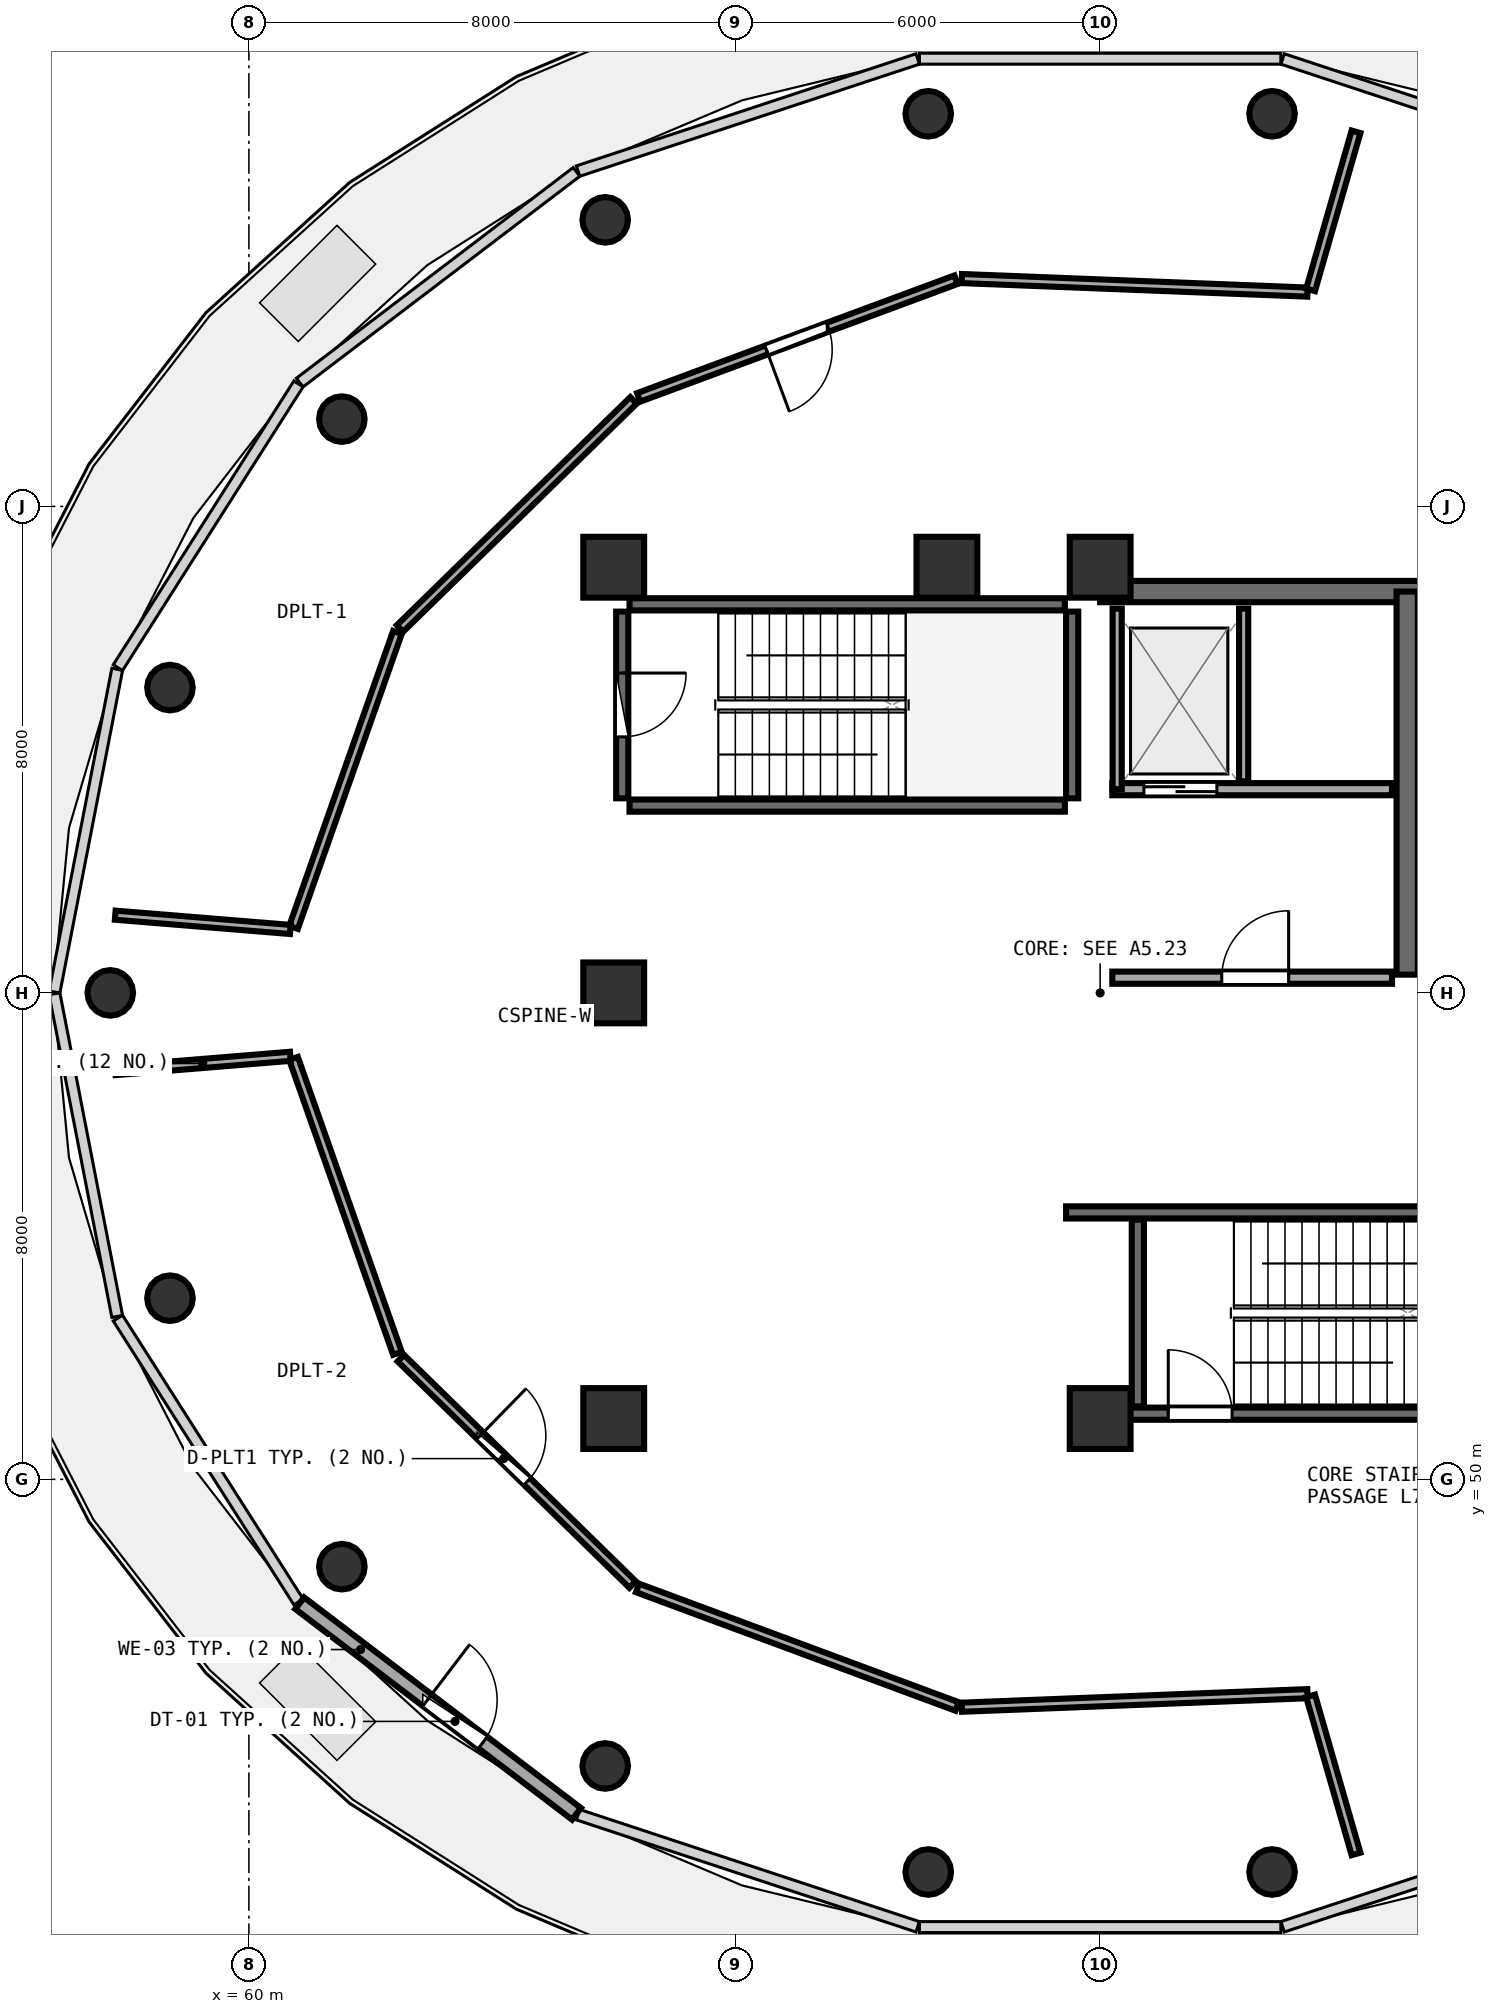
"""IFC4 building model, lengths in metres.
Left out: names, types, materials, properties, quantities, classifications, styles, units other than length and angle.
Written with IfcOpenShell. Run it as: python <this file> out.ifc"""

import sys

from ifc_helpers import new_model, si_unit, direction, frame, frame_2d, origin, origin_2d, place, context, subcontext, project, spatial, rectangle, circle, extrude, element, fill, save


model = new_model("IFC4")
c1 = context("Model", 3, precision=1e-05, world=origin(), true_north=direction((0.0, 1.0)))
c2 = subcontext(c1, "Body", "Model", "MODEL_VIEW")
j1 = project(units=[si_unit("LENGTHUNIT", "METRE"), si_unit("PLANEANGLEUNIT", "RADIAN")], contexts=[c1])
p1 = place(None, origin())
s1 = spatial("IfcSite", under=j1, at=p1, CompositionType="ELEMENT")
p2 = place(p1, origin())
s2 = spatial("IfcBuilding", under=s1, at=p2, CompositionType="ELEMENT")
p3 = place(p2, frame((0.0, 0.0, 298.5)))
s3 = spatial("IfcBuildingStorey", under=s2, at=p3, CompositionType="ELEMENT", Elevation=298.5)
for number, where, z_axis, x_axis in (
    (1, (66.0, 51.0, 0.0), (0.0, 0.0, 1.0), (1.0, 0.0, 0.0)),
    (2, (74.0, 51.0, 0.0), (0.0, 0.0, 1.0), (1.0, 0.0, 0.0)),
    (3, (74.0, 65.0, 0.0), (0.0, 0.0, 1.0), (1.0, 0.0, 0.0)),
    (4, (71.48, 65.0, 0.0), (0.0, 0.0, 1.0), (1.0, 0.0, 0.0)),
    (5, (66.0, 65.0, 0.0), (0.0, 0.0, 1.0), (1.0, 0.0, 0.0)),
    (6, (66.0, 58.0, 0.0), (0.0, 0.0, 1.0), (1.0, 0.0, 0.0)),
):
    element("IfcColumn", number, at=place(p3, frame(where, z_axis=z_axis, x_axis=x_axis)), inside=s3, PredefinedType="PILASTER", context=c2, shape_type="SweptSolid", body=[
        extrude(rectangle(XDim=1.0, YDim=1.0, at=origin_2d()), origin(), (0.0, 0.0, 1.0), 4.2),
    ])
for number, where, z_axis, x_axis in (
    (7, (76.827, 72.457, 0.0), (0.0, 0.0, 1.0), (1.0, 0.0, 0.0)),
    (8, (71.173, 72.457, 0.0), (0.0, 0.0, 1.0), (1.0, 0.0, 0.0)),
    (9, (65.86, 70.713, 0.0), (0.0, 0.0, 1.0), (1.0, 0.0, 0.0)),
    (10, (61.529, 67.436, 0.0), (0.0, 0.0, 1.0), (1.0, 0.0, 0.0)),
    (11, (58.702, 63.021, 0.0), (0.0, 0.0, 1.0), (1.0, 0.0, 0.0)),
    (12, (57.72, 58.0, 0.0), (0.0, 0.0, 1.0), (1.0, 0.0, 0.0)),
    (13, (58.702, 52.979, 0.0), (0.0, 0.0, 1.0), (1.0, 0.0, 0.0)),
    (14, (61.529, 48.564, 0.0), (0.0, 0.0, 1.0), (1.0, 0.0, 0.0)),
    (15, (65.86, 45.287, 0.0), (0.0, 0.0, 1.0), (1.0, 0.0, 0.0)),
    (16, (71.173, 43.543, 0.0), (0.0, 0.0, 1.0), (1.0, 0.0, 0.0)),
    (17, (76.827, 43.543, 0.0), (0.0, 0.0, 1.0), (1.0, 0.0, 0.0)),
):
    element("IfcColumn", number, at=place(p3, frame(where, z_axis=z_axis, x_axis=x_axis)), inside=s3, PredefinedType="COLUMN", context=c2, shape_type="SweptSolid", body=[
        extrude(circle(Radius=0.375, at=origin_2d()), origin(), (0.0, 0.0, 1.0), 4.2),
    ])
p4 = place(p3, frame((60.836, 47.963, 0.0), z_axis=(0.0, 0.0, 1.0), x_axis=(0.795770568915, -0.605598218004, 0.0)))
e18 = element("IfcWall", 18, at=p4, inside=s3, PredefinedType="SOLIDWALL", context=c2, shape_type="SweptSolid", body=[
    extrude(rectangle(XDim=5.72, YDim=0.24, at=frame_2d((2.86, 0.0))), origin(), (0.0, 0.0, 1.0), 3.925),
])
p5 = place(p4, frame((2.635, 0.0, 0.0)))
e19 = element("IfcOpeningElement", 19, at=p5, cuts=e18, PredefinedType="OPENING", context=c2, shape_type="SweptSolid", body=[
    extrude(rectangle(XDim=1.15, YDim=2.15, at=frame_2d((0.575, 1.075))), frame((0.0, 0.13, 0.0), z_axis=(0.0, -1.0, 0.0), x_axis=(1.0, 0.0, 0.0)), (0.0, 0.0, 1.0), 0.26),
])
p6 = place(p3, frame((66.26, 61.08, 0.0), z_axis=(0.0, 0.0, 1.0), x_axis=(1.0, 0.0, 0.0)))
e20 = element("IfcWall", 20, at=p6, inside=s3, PredefinedType="SHEAR", context=c2, shape_type="SweptSolid", body=[
    extrude(rectangle(XDim=7.16, YDim=0.2, at=frame_2d((3.58, 0.0))), origin(), (0.0, 0.0, 1.0), 3.94),
])
p7 = place(p3, frame((73.54, 61.2, 0.0), z_axis=(0.0, 0.0, 1.0), x_axis=(0.0, 1.0, 0.0)))
e21 = element("IfcWall", 21, at=p7, inside=s3, PredefinedType="SHEAR", context=c2, shape_type="SweptSolid", body=[
    extrude(rectangle(XDim=3.07, YDim=0.2, at=frame_2d((1.535, 0.0))), origin(), (0.0, 0.0, 1.0), 3.94),
])
p8 = place(p3, frame((73.42, 64.39, 0.0), z_axis=(0.0, 0.0, 1.0), x_axis=(-1.0, 0.0, 0.0)))
e22 = element("IfcWall", 22, at=p8, inside=s3, PredefinedType="SHEAR", context=c2, shape_type="SweptSolid", body=[
    extrude(rectangle(XDim=7.16, YDim=0.2, at=frame_2d((3.58, 0.0))), origin(), (0.0, 0.0, 1.0), 3.94),
])
p9 = place(p3, frame((66.14, 64.27, 0.0), z_axis=(0.0, 0.0, 1.0), x_axis=(0.0, -1.0, 0.0)))
e23 = element("IfcWall", 23, at=p9, inside=s3, PredefinedType="SHEAR", context=c2, shape_type="SweptSolid", body=[
    extrude(rectangle(XDim=3.07, YDim=0.2, at=frame_2d((1.535, 0.0))), origin(), (0.0, 0.0, 1.0), 3.94),
])
p10 = place(p9, frame((1.01, 0.0, 0.0)))
e24 = element("IfcOpeningElement", 24, at=p10, cuts=e23, PredefinedType="OPENING", context=c2, shape_type="SweptSolid", body=[
    extrude(rectangle(XDim=1.05, YDim=2.1, at=frame_2d((0.525, 1.05))), frame((0.0, 0.11, 0.0), z_axis=(0.0, -1.0, 0.0), x_axis=(1.0, 0.0, 0.0)), (0.0, 0.0, 1.0), 0.22),
])
p11 = place(p3, frame((74.0, 51.08, 0.0), z_axis=(0.0, 0.0, 1.0), x_axis=(1.0, 0.0, 0.0)))
e25 = element("IfcWall", 25, at=p11, inside=s3, PredefinedType="SHEAR", context=c2, shape_type="SweptSolid", body=[
    extrude(rectangle(XDim=7.9, YDim=0.2, at=frame_2d((3.95, 0.0))), origin(), (0.0, 0.0, 1.0), 3.94),
])
p12 = place(p11, frame((1.12, 0.0, 0.0)))
e26 = element("IfcOpeningElement", 26, at=p12, cuts=e25, PredefinedType="OPENING", context=c2, shape_type="SweptSolid", body=[
    extrude(rectangle(XDim=1.05, YDim=2.1, at=frame_2d((0.525, 1.05))), frame((0.0, 0.11, 0.0), z_axis=(0.0, -1.0, 0.0), x_axis=(1.0, 0.0, 0.0)), (0.0, 0.0, 1.0), 0.22),
])
p13 = place(p3, frame((81.9, 54.39, 0.0), z_axis=(0.0, 0.0, 1.0), x_axis=(-1.0, 0.0, 0.0)))
e27 = element("IfcWall", 27, at=p13, inside=s3, PredefinedType="SHEAR", context=c2, shape_type="SweptSolid", body=[
    extrude(rectangle(XDim=8.46, YDim=0.2, at=frame_2d((4.23, 0.0))), origin(), (0.0, 0.0, 1.0), 3.94),
])
p14 = place(p3, frame((74.62, 54.27, 0.0), z_axis=(0.0, 0.0, 1.0), x_axis=(0.0, -1.0, 0.0)))
e28 = element("IfcWall", 28, at=p14, inside=s3, PredefinedType="SHEAR", context=c2, shape_type="SweptSolid", body=[
    extrude(rectangle(XDim=3.07, YDim=0.2, at=frame_2d((1.535, 0.0))), origin(), (0.0, 0.0, 1.0), 3.94),
])
p15 = place(p3, frame((74.0, 64.6, 0.0), z_axis=(0.0, 0.0, 1.0), x_axis=(1.0, 0.0, 0.0)))
e29 = element("IfcWall", 29, at=p15, inside=s3, PredefinedType="SHEAR", context=c2, shape_type="SweptSolid", body=[
    extrude(rectangle(XDim=8.0, YDim=0.35, at=frame_2d((4.0, 0.0))), origin(), (0.0, 0.0, 1.0), 3.94),
])
p16 = place(p3, frame((79.05, 58.3, 0.0), z_axis=(0.0, 0.0, 1.0), x_axis=(0.0, 1.0, 0.0)))
e30 = element("IfcWall", 30, at=p16, inside=s3, PredefinedType="SHEAR", context=c2, shape_type="SweptSolid", body=[
    extrude(rectangle(XDim=6.3, YDim=0.35, at=frame_2d((3.15, 0.0))), origin(), (0.0, 0.0, 1.0), 3.94),
])
p17 = place(p3, frame((74.2, 61.35, 0.0), z_axis=(0.0, 0.0, 1.0), x_axis=(1.0, 0.0, 0.0)))
e31 = element("IfcWall", 31, at=p17, inside=s3, PredefinedType="SOLIDWALL", context=c2, shape_type="SweptSolid", body=[
    extrude(rectangle(XDim=4.6, YDim=0.2, at=frame_2d((2.3, 0.0))), origin(), (0.0, 0.0, 1.0), 3.93),
])
p18 = place(p17, frame((0.52, 0.0, 0.0)))
e32 = element("IfcOpeningElement", 32, at=p18, cuts=e31, PredefinedType="OPENING", context=c2, shape_type="SweptSolid", body=[
    extrude(rectangle(XDim=1.2, YDim=2.15, at=frame_2d((0.6, 1.075))), frame((0.0, 0.11, 0.0), z_axis=(0.0, -1.0, 0.0), x_axis=(1.0, 0.0, 0.0)), (0.0, 0.0, 1.0), 0.22),
])
p19 = place(p3, frame((74.28, 61.35, 0.0), z_axis=(0.0, 0.0, 1.0), x_axis=(0.0, 1.0, 0.0)))
e33 = element("IfcWall", 33, at=p19, inside=s3, PredefinedType="PARTITIONING", context=c2, shape_type="SweptSolid", body=[
    extrude(rectangle(XDim=2.97, YDim=0.15, at=frame_2d((1.485, 0.0))), origin(), (0.0, 0.0, 1.0), 3.93),
])
p20 = place(p3, frame((76.36, 61.48, 0.0), z_axis=(0.0, 0.0, 1.0), x_axis=(0.0, 1.0, 0.0)))
e34 = element("IfcWall", 34, at=p20, inside=s3, PredefinedType="PARTITIONING", context=c2, shape_type="SweptSolid", body=[
    extrude(rectangle(XDim=2.84, YDim=0.15, at=frame_2d((1.42, 0.0))), origin(), (0.0, 0.0, 1.0), 3.93),
])
p21 = place(p3, frame((74.2, 58.25, 0.0), z_axis=(0.0, 0.0, 1.0), x_axis=(1.0, 0.0, 0.0)))
e35 = element("IfcWall", 35, at=p21, inside=s3, PredefinedType="SOLIDWALL", context=c2, shape_type="SweptSolid", body=[
    extrude(rectangle(XDim=4.6, YDim=0.2, at=frame_2d((2.3, 0.0))), origin(), (0.0, 0.0, 1.0), 3.93),
])
p22 = place(p21, frame((1.8, 0.0, 0.0)))
e36 = element("IfcOpeningElement", 36, at=p22, cuts=e35, PredefinedType="OPENING", context=c2, shape_type="SweptSolid", body=[
    extrude(rectangle(XDim=1.1, YDim=2.1, at=frame_2d((0.55, 1.05))), frame((0.0, 0.11, 0.0), z_axis=(0.0, -1.0, 0.0), x_axis=(1.0, 0.0, 0.0)), (0.0, 0.0, 1.0), 0.22),
])
p23 = place(p3, frame((71.629, 69.728, 0.0), z_axis=(0.0, 0.0, 1.0), x_axis=(-0.937610047719, -0.34768865155, 0.0)))
e37 = element("IfcWall", 37, at=p23, inside=s3, PredefinedType="PARTITIONING", context=c2, shape_type="SweptSolid", body=[
    extrude(rectangle(XDim=5.565, YDim=0.15, at=frame_2d((2.783, 0.0))), origin(), (0.0, 0.0, 1.0), 3.525),
])
p24 = place(p23, frame((2.243, 0.0, 0.0)))
e38 = element("IfcOpeningElement", 38, at=p24, cuts=e37, PredefinedType="OPENING", context=c2, shape_type="SweptSolid", body=[
    extrude(rectangle(XDim=1.08, YDim=2.1, at=frame_2d((0.54, 1.05))), frame((0.0, 0.085, 0.0), z_axis=(0.0, -1.0, 0.0), x_axis=(1.0, 0.0, 0.0)), (0.0, 0.0, 1.0), 0.17),
])
p25 = place(p3, frame((62.499, 51.993, 0.0), z_axis=(0.0, 0.0, 1.0), x_axis=(0.71541878573, -0.698695900249, 0.0)))
e39 = element("IfcWall", 39, at=p25, inside=s3, PredefinedType="PARTITIONING", context=c2, shape_type="SweptSolid", body=[
    extrude(rectangle(XDim=5.329, YDim=0.15, at=frame_2d((2.664, 0.0))), origin(), (0.0, 0.0, 1.0), 3.525),
])
p26 = place(p25, frame((1.824, 0.0, 0.0)))
e40 = element("IfcOpeningElement", 40, at=p26, cuts=e39, PredefinedType="OPENING", context=c2, shape_type="SweptSolid", body=[
    extrude(rectangle(XDim=1.08, YDim=2.1, at=frame_2d((0.54, 1.05))), frame((0.0, 0.085, 0.0), z_axis=(0.0, -1.0, 0.0), x_axis=(1.0, 0.0, 0.0)), (0.0, 0.0, 1.0), 0.17),
])
p27 = place(p3, frame((77.41, 69.525, 0.0), z_axis=(0.0, 0.0, 1.0), x_axis=(-0.999233860457, 0.03913683834, 0.0)))
e41 = element("IfcWall", 41, at=p27, inside=s3, PredefinedType="PARTITIONING", context=c2, shape_type="SweptSolid", body=[
    extrude(rectangle(XDim=5.689, YDim=0.15, at=frame_2d((2.845, 0.0))), origin(), (0.0, 0.0, 1.0), 3.525),
])
p28 = place(p3, frame((66.325, 67.744, 0.0), z_axis=(0.0, 0.0, 1.0), x_axis=(-0.715402081333, -0.698713004047, 0.0)))
e42 = element("IfcWall", 42, at=p28, inside=s3, PredefinedType="PARTITIONING", context=c2, shape_type="SweptSolid", body=[
    extrude(rectangle(XDim=5.369, YDim=0.15, at=frame_2d((2.684, 0.0))), origin(), (0.0, 0.0, 1.0), 3.525),
])
p29 = place(p3, frame((62.443, 63.927, 0.0), z_axis=(0.0, 0.0, 1.0), x_axis=(-0.332236382146, -0.943196154773, 0.0)))
e43 = element("IfcWall", 43, at=p29, inside=s3, PredefinedType="PARTITIONING", context=c2, shape_type="SweptSolid", body=[
    extrude(rectangle(XDim=5.142, YDim=0.15, at=frame_2d((2.571, 0.0))), origin(), (0.0, 0.0, 1.0), 3.525),
])
p30 = place(p3, frame((60.681, 59.043, 0.0), z_axis=(0.0, 0.0, 1.0), x_axis=(-0.996696214814, 0.081219796696, 0.0)))
e44 = element("IfcWall", 44, at=p30, inside=s3, PredefinedType="PARTITIONING", context=c2, shape_type="SweptSolid", body=[
    extrude(rectangle(XDim=2.889, YDim=0.15, at=frame_2d((1.444, 0.0))), origin(), (0.0, 0.0, 1.0), 3.525),
])
p31 = place(p3, frame((78.208, 72.161, 0.0), z_axis=(0.0, 0.0, 1.0), x_axis=(-0.276223004297, -0.961093570833, 0.0)))
e45 = element("IfcWall", 45, at=p31, inside=s3, PredefinedType="PARTITIONING", context=c2, shape_type="SweptSolid", body=[
    extrude(rectangle(XDim=2.705, YDim=0.15, at=frame_2d((1.352, 0.0))), origin(), (0.0, 0.0, 1.0), 3.525),
])
p32 = place(p3, frame((60.734, 56.922, 0.0), z_axis=(0.0, 0.0, 1.0), x_axis=(0.332236382146, -0.943196154773, 0.0)))
e46 = element("IfcWall", 46, at=p32, inside=s3, PredefinedType="PARTITIONING", context=c2, shape_type="SweptSolid", body=[
    extrude(rectangle(XDim=5.142, YDim=0.15, at=frame_2d((2.571, 0.0))), origin(), (0.0, 0.0, 1.0), 3.525),
])
p33 = place(p3, frame((66.392, 48.214, 0.0), z_axis=(0.0, 0.0, 1.0), x_axis=(0.937597367655, -0.347722843894, 0.0)))
e47 = element("IfcWall", 47, at=p33, inside=s3, PredefinedType="PARTITIONING", context=c2, shape_type="SweptSolid", body=[
    extrude(rectangle(XDim=5.606, YDim=0.15, at=frame_2d((2.803, 0.0))), origin(), (0.0, 0.0, 1.0), 3.625),
])
p34 = place(p3, frame((71.725, 46.253, 0.0), z_axis=(0.0, 0.0, 1.0), x_axis=(0.999233860457, 0.03913683834, 0.0)))
e48 = element("IfcWall", 48, at=p34, inside=s3, PredefinedType="PARTITIONING", context=c2, shape_type="SweptSolid", body=[
    extrude(rectangle(XDim=5.689, YDim=0.15, at=frame_2d((2.845, 0.0))), origin(), (0.0, 0.0, 1.0), 3.525),
])
p35 = place(p3, frame((77.461, 46.439, 0.0), z_axis=(0.0, 0.0, 1.0), x_axis=(0.276223004297, -0.961093570833, 0.0)))
e49 = element("IfcWall", 49, at=p35, inside=s3, PredefinedType="PARTITIONING", context=c2, shape_type="SweptSolid", body=[
    extrude(rectangle(XDim=2.705, YDim=0.15, at=frame_2d((1.352, 0.0))), origin(), (0.0, 0.0, 1.0), 3.525),
])
p36 = place(p3, frame((57.802, 56.722, 0.0), z_axis=(0.0, 0.0, 1.0), x_axis=(0.996696214814, 0.081219796696, 0.0)))
e50 = element("IfcWall", 50, at=p36, inside=s3, PredefinedType="PARTITIONING", context=c2, shape_type="SweptSolid", body=[
    extrude(rectangle(XDim=2.889, YDim=0.15, at=frame_2d((1.444, 0.0))), origin(), (0.0, 0.0, 1.0), 3.525),
])
p37 = place(p5, frame((1.15, 0.0, 0.0), z_axis=(0.0, 0.0, 1.0), x_axis=(-1.0, 0.0, 0.0)))
e51 = element("IfcDoor", 51, at=p37, inside=s3, OperationType="SINGLE_SWING_RIGHT", PredefinedType="DOOR", context=c2, shape_type="SweptSolid", body=[
    extrude(rectangle(XDim=1.15, YDim=2.15, at=frame_2d((0.575, 1.075))), frame((0.0, 0.025, 0.0), z_axis=(0.0, -1.0, 0.0), x_axis=(1.0, 0.0, 0.0)), (0.0, 0.0, 1.0), 0.05),
])
fill(e19, e51)
p38 = place(p10, origin())
e52 = element("IfcDoor", 52, at=p38, inside=s3, OperationType="SINGLE_SWING_LEFT", PredefinedType="DOOR", context=c2, shape_type="SweptSolid", body=[
    extrude(rectangle(XDim=1.05, YDim=2.1, at=frame_2d((0.525, 1.05))), frame((0.0, 0.025, 0.0), z_axis=(0.0, -1.0, 0.0), x_axis=(1.0, 0.0, 0.0)), (0.0, 0.0, 1.0), 0.05),
])
fill(e24, e52)
p39 = place(p12, origin())
e53 = element("IfcDoor", 53, at=p39, inside=s3, OperationType="SINGLE_SWING_LEFT", PredefinedType="DOOR", context=c2, shape_type="SweptSolid", body=[
    extrude(rectangle(XDim=1.05, YDim=2.1, at=frame_2d((0.525, 1.05))), frame((0.0, 0.025, 0.0), z_axis=(0.0, -1.0, 0.0), x_axis=(1.0, 0.0, 0.0)), (0.0, 0.0, 1.0), 0.05),
])
fill(e26, e53)
p40 = place(p18, origin())
e54 = element("IfcDoor", 54, at=p40, inside=s3, OperationType="DOUBLE_DOOR_SLIDING", PredefinedType="DOOR", context=c2, shape_type="SweptSolid", body=[
    extrude(rectangle(XDim=1.2, YDim=2.15, at=frame_2d((0.6, 1.075))), frame((0.0, 0.025, 0.0), z_axis=(0.0, -1.0, 0.0), x_axis=(1.0, 0.0, 0.0)), (0.0, 0.0, 1.0), 0.05),
])
fill(e32, e54)
p41 = place(p22, frame((1.1, 0.0, 0.0), z_axis=(0.0, 0.0, 1.0), x_axis=(-1.0, 0.0, 0.0)))
e55 = element("IfcDoor", 55, at=p41, inside=s3, OperationType="SINGLE_SWING_LEFT", PredefinedType="DOOR", context=c2, shape_type="SweptSolid", body=[
    extrude(rectangle(XDim=1.1, YDim=2.1, at=frame_2d((0.55, 1.05))), frame((0.0, 0.025, 0.0), z_axis=(0.0, -1.0, 0.0), x_axis=(1.0, 0.0, 0.0)), (0.0, 0.0, 1.0), 0.05),
])
fill(e36, e55)
p42 = place(p24, origin())
e56 = element("IfcDoor", 56, at=p42, inside=s3, OperationType="SINGLE_SWING_RIGHT", PredefinedType="DOOR", context=c2, shape_type="SweptSolid", body=[
    extrude(rectangle(XDim=1.08, YDim=2.1, at=frame_2d((0.54, 1.05))), frame((0.0, 0.025, 0.0), z_axis=(0.0, -1.0, 0.0), x_axis=(1.0, 0.0, 0.0)), (0.0, 0.0, 1.0), 0.05),
])
fill(e38, e56)
p43 = place(p26, origin())
e57 = element("IfcDoor", 57, at=p43, inside=s3, OperationType="SINGLE_SWING_LEFT", PredefinedType="DOOR", context=c2, shape_type="SweptSolid", body=[
    extrude(rectangle(XDim=1.08, YDim=2.1, at=frame_2d((0.54, 1.05))), frame((0.0, 0.025, 0.0), z_axis=(0.0, -1.0, 0.0), x_axis=(1.0, 0.0, 0.0)), (0.0, 0.0, 1.0), 0.05),
])
fill(e40, e57)
save(model, sys.argv[1])
